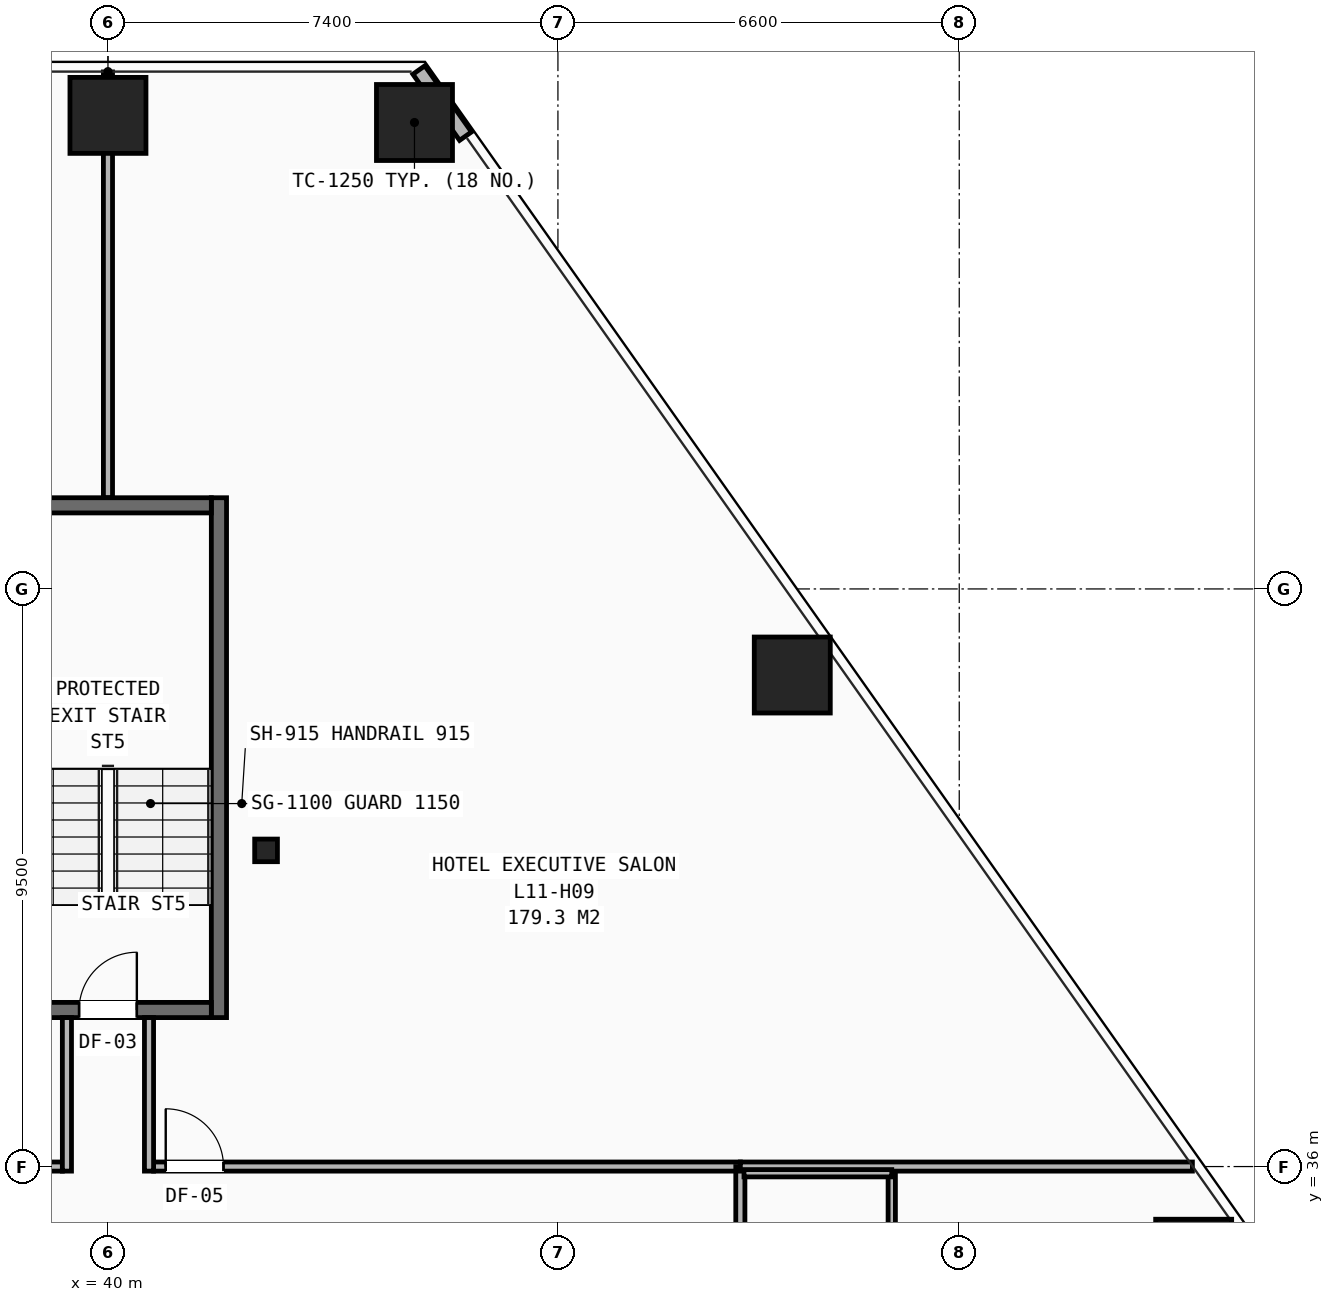
"""IFC4 building model, lengths in metres.
Left out: names, types, materials, properties, quantities, classifications, styles, units other than length and angle.
Written with IfcOpenShell. Run it as: python <this file> out.ifc"""

import sys

from ifc_helpers import new_model, si_unit, direction, frame, frame_2d, origin, origin_2d, place, context, subcontext, project, spatial, rectangle, hollow_rectangle, i_section, extrude, element, fill, save


model = new_model("IFC4")
c1 = context("Model", 3, precision=1e-05, world=origin(), true_north=direction((0.0, 1.0)))
c2 = subcontext(c1, "Body", "Model", "MODEL_VIEW")
j1 = project(units=[si_unit("LENGTHUNIT", "METRE"), si_unit("PLANEANGLEUNIT", "RADIAN")], contexts=[c1])
p1 = place(None, origin())
s1 = spatial("IfcSite", under=j1, at=p1, CompositionType="ELEMENT")
p2 = place(p1, origin())
s2 = spatial("IfcBuilding", under=s1, at=p2, CompositionType="ELEMENT")
p3 = place(p2, frame((0.0, 0.0, 43.2)))
s3 = spatial("IfcBuildingStorey", under=s2, at=p3, CompositionType="ELEMENT", Elevation=43.2)
p4 = place(p3, frame((42.6, 41.2, 0.0), z_axis=(0.0, 0.0, 1.0), x_axis=(1.0, 0.0, 0.0)))
e1 = element("IfcColumn", 1, at=p4, inside=s3, PredefinedType="COLUMN", context=c2, shape_type="SweptSolid", body=[
    extrude(i_section(OverallWidth=0.374, OverallDepth=0.372, WebThickness=0.016, FlangeThickness=0.026, at=origin_2d()), origin(), (0.0, 0.0, 1.0), 3.2),
])
for number, where, z_axis, x_axis in (
    (2, (45.041, 53.172, 0.0), (0.0, 0.0, 1.0), (1.0, 0.0, 0.0)),
    (3, (40.0, 53.289, 0.0), (0.0, 0.0, 1.0), (1.0, 0.0, 0.0)),
    (4, (57.855, 34.509, 0.0), (0.0, 0.0, 1.0), (1.0, 0.0, 0.0)),
    (5, (51.254, 44.084, 0.0), (0.0, 0.0, 1.0), (1.0, 0.0, 0.0)),
):
    element("IfcColumn", number, at=place(p3, frame(where, z_axis=z_axis, x_axis=x_axis)), inside=s3, PredefinedType="COLUMN", context=c2, shape_type="SweptSolid", body=[
        extrude(hollow_rectangle(XDim=1.25, YDim=1.25, WallThickness=0.08, at=origin_2d()), origin(), (0.0, 0.0, 1.0), 3.2),
    ])
p5 = place(p3, frame((45.881, 52.947, 0.0), z_axis=(0.0, 0.0, 1.0), x_axis=(-0.576510403346, 0.817089808304, 0.0)))
e6 = element("IfcWall", 6, at=p5, inside=s3, PredefinedType="SHEAR", context=c2, shape_type="SweptSolid", body=[
    extrude(rectangle(XDim=1.332, YDim=0.24, at=frame_2d((0.666, 0.0))), origin(), (0.0, 0.0, 1.0), 2.263),
])
p6 = place(p3, frame((29.6, 36.0, 0.0), z_axis=(0.0, 0.0, 1.0), x_axis=(1.0, 0.0, 0.0)))
e7 = element("IfcWall", 7, at=p6, inside=s3, PredefinedType="PARTITIONING", context=c2, shape_type="SweptSolid", body=[
    extrude(rectangle(XDim=9.65, YDim=0.15, at=frame_2d((4.825, 0.0))), origin(), (0.0, 0.0, 1.0), 2.98),
])
p7 = place(p6, frame((0.57, 0.0, 0.0)))
e8 = element("IfcOpeningElement", 8, at=p7, cuts=e7, PredefinedType="OPENING", context=c2, shape_type="SweptSolid", body=[
    extrude(rectangle(XDim=0.95, YDim=2.1, at=frame_2d((0.475, 1.05))), frame((0.0, 0.085, 0.0), z_axis=(0.0, -1.0, 0.0), x_axis=(1.0, 0.0, 0.0)), (0.0, 0.0, 1.0), 0.17),
])
p8 = place(p3, frame((40.75, 36.0, 0.0), z_axis=(0.0, 0.0, 1.0), x_axis=(1.0, 0.0, 0.0)))
e9 = element("IfcWall", 9, at=p8, inside=s3, PredefinedType="PARTITIONING", context=c2, shape_type="SweptSolid", body=[
    extrude(rectangle(XDim=9.65, YDim=0.15, at=frame_2d((4.825, 0.0))), origin(), (0.0, 0.0, 1.0), 2.513),
])
p9 = place(p8, frame((0.2, 0.0, 0.0)))
e10 = element("IfcOpeningElement", 10, at=p9, cuts=e9, PredefinedType="OPENING", context=c2, shape_type="SweptSolid", body=[
    extrude(rectangle(XDim=0.95, YDim=2.1, at=frame_2d((0.475, 1.05))), frame((0.0, 0.085, 0.0), z_axis=(0.0, -1.0, 0.0), x_axis=(1.0, 0.0, 0.0)), (0.0, 0.0, 1.0), 0.17),
])
p10 = place(p3, frame((50.4, 14.1, 0.0), z_axis=(0.0, 0.0, 1.0), x_axis=(0.0, 1.0, 0.0)))
e11 = element("IfcWall", 11, at=p10, inside=s3, PredefinedType="PARTITIONING", context=c2, shape_type="SweptSolid", body=[
    extrude(rectangle(XDim=21.9, YDim=0.15, at=frame_2d((10.95, 0.0))), origin(), (0.0, 0.0, 1.0), 2.191),
])
p11 = place(p10, frame((0.42, 0.0, 0.0)))
e12 = element("IfcOpeningElement", 12, at=p11, cuts=e11, PredefinedType="OPENING", context=c2, shape_type="SweptSolid", body=[
    extrude(rectangle(XDim=0.95, YDim=2.1, at=frame_2d((0.475, 1.05))), frame((0.0, 0.085, 0.0), z_axis=(0.0, -1.0, 0.0), x_axis=(1.0, 0.0, 0.0)), (0.0, 0.0, 1.0), 0.17),
])
p12 = place(p10, frame((7.32, 0.0, 0.0)))
e13 = element("IfcOpeningElement", 13, at=p12, cuts=e11, PredefinedType="OPENING", context=c2, shape_type="SweptSolid", body=[
    extrude(rectangle(XDim=0.95, YDim=2.1, at=frame_2d((0.475, 1.05))), frame((0.0, 0.085, 0.0), z_axis=(0.0, -1.0, 0.0), x_axis=(1.0, 0.0, 0.0)), (0.0, 0.0, 1.0), 0.17),
])
p13 = place(p10, frame((15.82, 0.0, 0.0)))
e14 = element("IfcOpeningElement", 14, at=p13, cuts=e11, PredefinedType="OPENING", context=c2, shape_type="SweptSolid", body=[
    extrude(rectangle(XDim=0.95, YDim=2.1, at=frame_2d((0.475, 1.05))), frame((0.0, 0.085, 0.0), z_axis=(0.0, -1.0, 0.0), x_axis=(1.0, 0.0, 0.0)), (0.0, 0.0, 1.0), 0.17),
])
p14 = place(p3, frame((50.4, 36.0, 0.0), z_axis=(0.0, 0.0, 1.0), x_axis=(1.0, 0.0, 0.0)))
e15 = element("IfcWall", 15, at=p14, inside=s3, PredefinedType="PARTITIONING", context=c2, shape_type="SweptSolid", body=[
    extrude(rectangle(XDim=7.434, YDim=0.15, at=frame_2d((3.717, 0.0))), origin(), (0.0, 0.0, 1.0), 2.268),
])
p15 = place(p3, frame((52.89, 33.61, 0.0), z_axis=(0.0, 0.0, 1.0), x_axis=(0.0, 1.0, 0.0)))
e16 = element("IfcWall", 16, at=p15, inside=s3, PredefinedType="PARTITIONING", context=c2, shape_type="SweptSolid", body=[
    extrude(rectangle(XDim=2.28, YDim=0.12, at=frame_2d((1.14, 0.0))), origin(), (0.0, 0.0, 1.0), 2.98),
])
p16 = place(p3, frame((50.46, 35.89, 0.0), z_axis=(0.0, 0.0, 1.0), x_axis=(1.0, 0.0, 0.0)))
e17 = element("IfcWall", 17, at=p16, inside=s3, PredefinedType="PARTITIONING", context=c2, shape_type="SweptSolid", body=[
    extrude(rectangle(XDim=2.43, YDim=0.12, at=frame_2d((1.215, 0.0))), origin(), (0.0, 0.0, 1.0), 2.513),
])
p17 = place(p3, frame((40.0, 47.0, 0.0), z_axis=(0.0, 0.0, 1.0), x_axis=(0.0, 1.0, 0.0)))
e18 = element("IfcWall", 18, at=p17, inside=s3, PredefinedType="PARTITIONING", context=c2, shape_type="SweptSolid", body=[
    extrude(rectangle(XDim=7.004, YDim=0.15, at=frame_2d((3.502, 0.0))), origin(), (0.0, 0.0, 1.0), 2.268),
])
p18 = place(p3, frame((41.825, 38.45, 0.0), z_axis=(0.0, 0.0, 1.0), x_axis=(0.0, 1.0, 0.0)))
e19 = element("IfcWall", 19, at=p18, inside=s3, PredefinedType="SHEAR", context=c2, shape_type="SweptSolid", body=[
    extrude(rectangle(XDim=8.55, YDim=0.25, at=frame_2d((4.275, 0.0))), origin(), (0.0, 0.0, 1.0), 2.98),
])
p19 = place(p3, frame((38.3, 38.575, 0.0), z_axis=(0.0, 0.0, 1.0), x_axis=(1.0, 0.0, 0.0)))
e20 = element("IfcWall", 20, at=p19, inside=s3, PredefinedType="SHEAR", context=c2, shape_type="SweptSolid", body=[
    extrude(rectangle(XDim=3.4, YDim=0.25, at=frame_2d((1.7, 0.0))), origin(), (0.0, 0.0, 1.0), 2.98),
])
p20 = place(p19, frame((1.225, 0.0, 0.0)))
e21 = element("IfcOpeningElement", 21, at=p20, cuts=e20, PredefinedType="OPENING", context=c2, shape_type="SweptSolid", body=[
    extrude(rectangle(XDim=0.95, YDim=2.1, at=frame_2d((0.475, 1.05))), frame((0.0, 0.135, 0.0), z_axis=(0.0, -1.0, 0.0), x_axis=(1.0, 0.0, 0.0)), (0.0, 0.0, 1.0), 0.27),
])
p21 = place(p3, frame((38.3, 46.875, 0.0), z_axis=(0.0, 0.0, 1.0), x_axis=(1.0, 0.0, 0.0)))
e22 = element("IfcWall", 22, at=p21, inside=s3, PredefinedType="SHEAR", context=c2, shape_type="SweptSolid", body=[
    extrude(rectangle(XDim=3.4, YDim=0.25, at=frame_2d((1.7, 0.0))), origin(), (0.0, 0.0, 1.0), 2.98),
])
for number, where, z_axis, x_axis in (
    (23, (39.325, 35.925, 0.0), (0.0, 0.0, 1.0), (0.0, 1.0, 0.0)),
    (24, (40.675, 35.925, 0.0), (0.0, 0.0, 1.0), (0.0, 1.0, 0.0)),
):
    element("IfcWall", number, at=place(p3, frame(where, z_axis=z_axis, x_axis=x_axis)), inside=s3, PredefinedType="PARTITIONING", context=c2, shape_type="SweptSolid", body=[
        extrude(rectangle(XDim=2.525, YDim=0.15, at=frame_2d((1.262, 0.0))), origin(), (0.0, 0.0, 1.0), 2.98),
    ])
p22 = place(p9, origin())
e25 = element("IfcDoor", 25, at=p22, inside=s3, OperationType="SINGLE_SWING_LEFT", PredefinedType="DOOR", context=c2, shape_type="SweptSolid", body=[
    extrude(rectangle(XDim=0.95, YDim=2.1, at=frame_2d((0.475, 1.05))), frame((0.0, 0.025, 0.0), z_axis=(0.0, -1.0, 0.0), x_axis=(1.0, 0.0, 0.0)), (0.0, 0.0, 1.0), 0.05),
])
fill(e10, e25)
p23 = place(p20, origin())
e26 = element("IfcDoor", 26, at=p23, inside=s3, OperationType="SINGLE_SWING_RIGHT", PredefinedType="DOOR", context=c2, shape_type="SweptSolid", body=[
    extrude(rectangle(XDim=0.95, YDim=2.1, at=frame_2d((0.475, 1.05))), frame((0.0, 0.025, 0.0), z_axis=(0.0, -1.0, 0.0), x_axis=(1.0, 0.0, 0.0)), (0.0, 0.0, 1.0), 0.05),
])
fill(e21, e26)
save(model, sys.argv[1])
